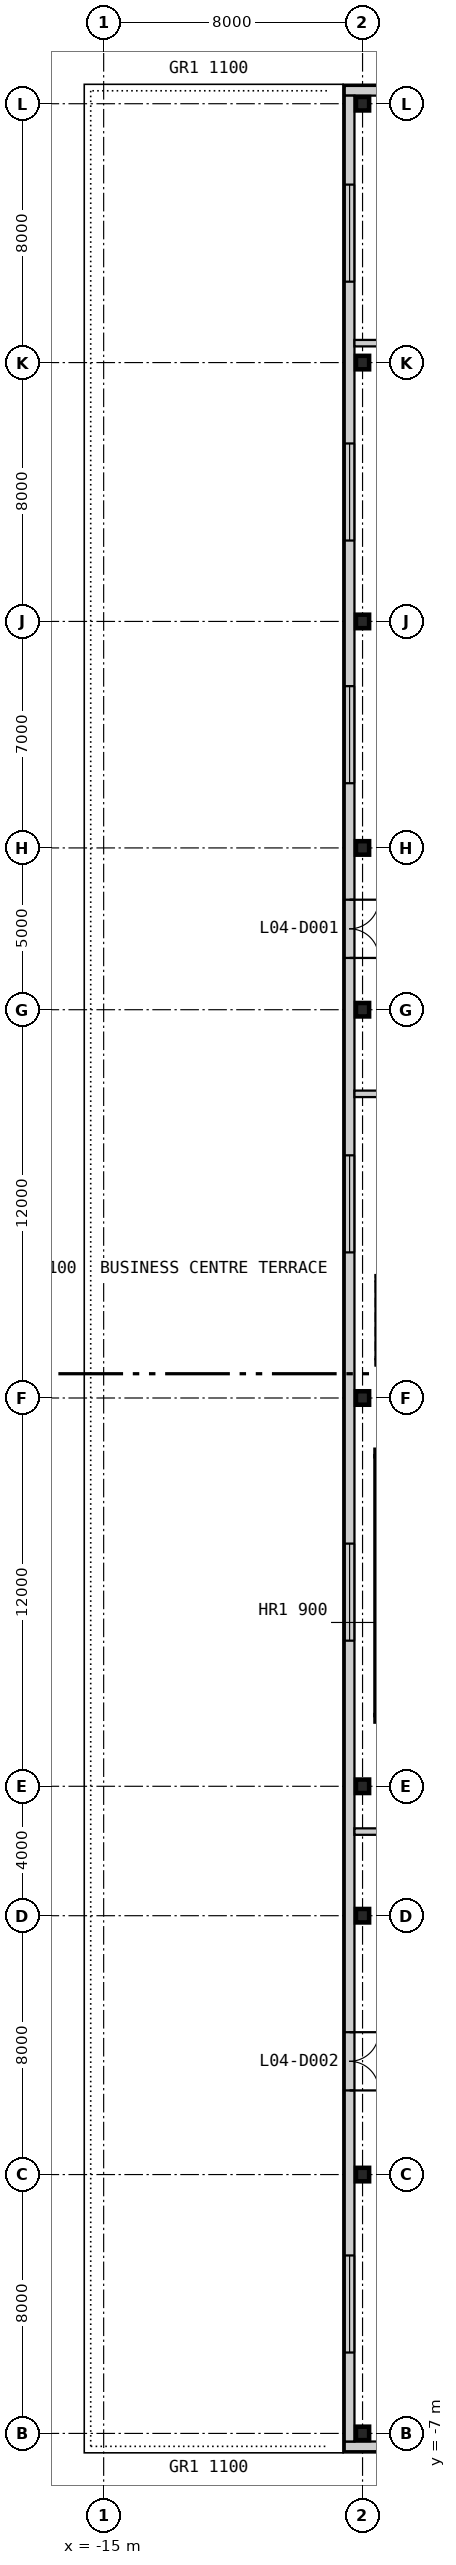
"""IFC4 building model, lengths in metres.
Left out: names, types, materials, properties, quantities, classifications, styles, units other than length and angle.
Written with IfcOpenShell. Run it as: python <this file> out.ifc"""

import sys

from ifc_helpers import new_model, si_unit, direction, frame, frame_2d, origin, origin_2d, place, context, subcontext, project, spatial, rectangle, i_section, extrude, element, fill, save


model = new_model("IFC4")
c1 = context("Model", 3, precision=1e-05, world=origin(), true_north=direction((0.0, 1.0)))
c2 = subcontext(c1, "Body", "Model", "MODEL_VIEW")
j1 = project(units=[si_unit("LENGTHUNIT", "METRE"), si_unit("PLANEANGLEUNIT", "RADIAN")], contexts=[c1])
p1 = place(None, origin())
s1 = spatial("IfcSite", under=j1, at=p1, CompositionType="ELEMENT")
p2 = place(p1, origin())
s2 = spatial("IfcBuilding", under=s1, at=p2, CompositionType="ELEMENT")
p3 = place(p2, frame((0.0, 0.0, 21.4)))
s3 = spatial("IfcBuildingStorey", under=s2, at=p3, CompositionType="ELEMENT", Elevation=21.4)
for number, where, z_axis, x_axis in (
    (1, (-7.0, -7.0, 0.0), (0.0, 0.0, 1.0), (1.0, 0.0, 0.0)),
    (2, (-7.0, 1.0, 0.0), (0.0, 0.0, 1.0), (1.0, 0.0, 0.0)),
    (3, (-7.0, 9.0, 0.0), (0.0, 0.0, 1.0), (1.0, 0.0, 0.0)),
    (4, (-7.0, 13.0, 0.0), (0.0, 0.0, 1.0), (1.0, 0.0, 0.0)),
    (5, (-7.0, 25.0, 0.0), (0.0, 0.0, 1.0), (1.0, 0.0, 0.0)),
    (6, (-7.0, 37.0, 0.0), (0.0, 0.0, 1.0), (1.0, 0.0, 0.0)),
    (7, (-7.0, 42.0, 0.0), (0.0, 0.0, 1.0), (1.0, 0.0, 0.0)),
    (8, (-7.0, 49.0, 0.0), (0.0, 0.0, 1.0), (1.0, 0.0, 0.0)),
    (9, (-7.0, 57.0, 0.0), (0.0, 0.0, 1.0), (1.0, 0.0, 0.0)),
    (10, (-7.0, 65.0, 0.0), (0.0, 0.0, 1.0), (1.0, 0.0, 0.0)),
):
    element("IfcColumn", number, at=place(p3, frame(where, z_axis=z_axis, x_axis=x_axis)), inside=s3, PredefinedType="COLUMN", context=c2, shape_type="SweptSolid", body=[
        extrude(i_section(OverallWidth=0.406, OverallDepth=0.417, WebThickness=0.03, FlangeThickness=0.048, at=origin_2d()), origin(), (0.0, 0.0, 1.0), 4.8),
    ])
p4 = place(p3, frame((-7.55, -7.4, 0.0), z_axis=(0.0, 0.0, 1.0), x_axis=(1.0, 0.0, 0.0)))
e11 = element("IfcWall", 11, at=p4, inside=s3, PredefinedType="SOLIDWALL", context=c2, shape_type="SweptSolid", body=[
    extrude(rectangle(XDim=65.1, YDim=0.3, at=frame_2d((32.55, 0.0))), origin(), (0.0, 0.0, 1.0), 4.5),
])
p5 = place(p4, frame((3.05, 0.0, 0.9)))
e12 = element("IfcOpeningElement", 12, at=p5, cuts=e11, PredefinedType="OPENING", context=c2, shape_type="SweptSolid", body=[
    extrude(rectangle(XDim=3.0, YDim=2.4, at=frame_2d((1.5, 1.2))), frame((0.0, 0.16, 0.0), z_axis=(0.0, -1.0, 0.0), x_axis=(1.0, 0.0, 0.0)), (0.0, 0.0, 1.0), 0.32),
])
p6 = place(p4, frame((11.05, 0.0, 0.9)))
e13 = element("IfcOpeningElement", 13, at=p6, cuts=e11, PredefinedType="OPENING", context=c2, shape_type="SweptSolid", body=[
    extrude(rectangle(XDim=3.0, YDim=2.4, at=frame_2d((1.5, 1.2))), frame((0.0, 0.16, 0.0), z_axis=(0.0, -1.0, 0.0), x_axis=(1.0, 0.0, 0.0)), (0.0, 0.0, 1.0), 0.32),
])
p7 = place(p4, frame((25.05, 0.0, 0.9)))
e14 = element("IfcOpeningElement", 14, at=p7, cuts=e11, PredefinedType="OPENING", context=c2, shape_type="SweptSolid", body=[
    extrude(rectangle(XDim=3.0, YDim=2.4, at=frame_2d((1.5, 1.2))), frame((0.0, 0.16, 0.0), z_axis=(0.0, -1.0, 0.0), x_axis=(1.0, 0.0, 0.0)), (0.0, 0.0, 1.0), 0.32),
])
p8 = place(p4, frame((37.05, 0.0, 0.9)))
e15 = element("IfcOpeningElement", 15, at=p8, cuts=e11, PredefinedType="OPENING", context=c2, shape_type="SweptSolid", body=[
    extrude(rectangle(XDim=3.0, YDim=2.4, at=frame_2d((1.5, 1.2))), frame((0.0, 0.16, 0.0), z_axis=(0.0, -1.0, 0.0), x_axis=(1.0, 0.0, 0.0)), (0.0, 0.0, 1.0), 0.32),
])
p9 = place(p4, frame((45.55, 0.0, 0.9)))
e16 = element("IfcOpeningElement", 16, at=p9, cuts=e11, PredefinedType="OPENING", context=c2, shape_type="SweptSolid", body=[
    extrude(rectangle(XDim=3.0, YDim=2.4, at=frame_2d((1.5, 1.2))), frame((0.0, 0.16, 0.0), z_axis=(0.0, -1.0, 0.0), x_axis=(1.0, 0.0, 0.0)), (0.0, 0.0, 1.0), 0.32),
])
p10 = place(p4, frame((51.55, 0.0, 0.9)))
e17 = element("IfcOpeningElement", 17, at=p10, cuts=e11, PredefinedType="OPENING", context=c2, shape_type="SweptSolid", body=[
    extrude(rectangle(XDim=3.0, YDim=2.4, at=frame_2d((1.5, 1.2))), frame((0.0, 0.16, 0.0), z_axis=(0.0, -1.0, 0.0), x_axis=(1.0, 0.0, 0.0)), (0.0, 0.0, 1.0), 0.32),
])
p11 = place(p4, frame((59.05, 0.0, 0.9)))
e18 = element("IfcOpeningElement", 18, at=p11, cuts=e11, PredefinedType="OPENING", context=c2, shape_type="SweptSolid", body=[
    extrude(rectangle(XDim=3.0, YDim=2.4, at=frame_2d((1.5, 1.2))), frame((0.0, 0.16, 0.0), z_axis=(0.0, -1.0, 0.0), x_axis=(1.0, 0.0, 0.0)), (0.0, 0.0, 1.0), 0.32),
])
p12 = place(p3, frame((57.55, 65.4, 0.0), z_axis=(0.0, 0.0, 1.0), x_axis=(-1.0, 0.0, 0.0)))
e19 = element("IfcWall", 19, at=p12, inside=s3, PredefinedType="SOLIDWALL", context=c2, shape_type="SweptSolid", body=[
    extrude(rectangle(XDim=65.1, YDim=0.3, at=frame_2d((32.55, 0.0))), origin(), (0.0, 0.0, 1.0), 4.5),
])
p13 = place(p12, frame((59.05, 0.0, 0.9)))
e20 = element("IfcOpeningElement", 20, at=p13, cuts=e19, PredefinedType="OPENING", context=c2, shape_type="SweptSolid", body=[
    extrude(rectangle(XDim=3.0, YDim=2.4, at=frame_2d((1.5, 1.2))), frame((0.0, 0.16, 0.0), z_axis=(0.0, -1.0, 0.0), x_axis=(1.0, 0.0, 0.0)), (0.0, 0.0, 1.0), 0.32),
])
p14 = place(p12, frame((51.05, 0.0, 0.9)))
e21 = element("IfcOpeningElement", 21, at=p14, cuts=e19, PredefinedType="OPENING", context=c2, shape_type="SweptSolid", body=[
    extrude(rectangle(XDim=3.0, YDim=2.4, at=frame_2d((1.5, 1.2))), frame((0.0, 0.16, 0.0), z_axis=(0.0, -1.0, 0.0), x_axis=(1.0, 0.0, 0.0)), (0.0, 0.0, 1.0), 0.32),
])
p15 = place(p12, frame((37.05, 0.0, 0.9)))
e22 = element("IfcOpeningElement", 22, at=p15, cuts=e19, PredefinedType="OPENING", context=c2, shape_type="SweptSolid", body=[
    extrude(rectangle(XDim=3.0, YDim=2.4, at=frame_2d((1.5, 1.2))), frame((0.0, 0.16, 0.0), z_axis=(0.0, -1.0, 0.0), x_axis=(1.0, 0.0, 0.0)), (0.0, 0.0, 1.0), 0.32),
])
p16 = place(p12, frame((25.05, 0.0, 0.9)))
e23 = element("IfcOpeningElement", 23, at=p16, cuts=e19, PredefinedType="OPENING", context=c2, shape_type="SweptSolid", body=[
    extrude(rectangle(XDim=3.0, YDim=2.4, at=frame_2d((1.5, 1.2))), frame((0.0, 0.16, 0.0), z_axis=(0.0, -1.0, 0.0), x_axis=(1.0, 0.0, 0.0)), (0.0, 0.0, 1.0), 0.32),
])
p17 = place(p12, frame((16.55, 0.0, 0.9)))
e24 = element("IfcOpeningElement", 24, at=p17, cuts=e19, PredefinedType="OPENING", context=c2, shape_type="SweptSolid", body=[
    extrude(rectangle(XDim=3.0, YDim=2.4, at=frame_2d((1.5, 1.2))), frame((0.0, 0.16, 0.0), z_axis=(0.0, -1.0, 0.0), x_axis=(1.0, 0.0, 0.0)), (0.0, 0.0, 1.0), 0.32),
])
p18 = place(p12, frame((10.55, 0.0, 0.9)))
e25 = element("IfcOpeningElement", 25, at=p18, cuts=e19, PredefinedType="OPENING", context=c2, shape_type="SweptSolid", body=[
    extrude(rectangle(XDim=3.0, YDim=2.4, at=frame_2d((1.5, 1.2))), frame((0.0, 0.16, 0.0), z_axis=(0.0, -1.0, 0.0), x_axis=(1.0, 0.0, 0.0)), (0.0, 0.0, 1.0), 0.32),
])
p19 = place(p12, frame((3.05, 0.0, 0.9)))
e26 = element("IfcOpeningElement", 26, at=p19, cuts=e19, PredefinedType="OPENING", context=c2, shape_type="SweptSolid", body=[
    extrude(rectangle(XDim=3.0, YDim=2.4, at=frame_2d((1.5, 1.2))), frame((0.0, 0.16, 0.0), z_axis=(0.0, -1.0, 0.0), x_axis=(1.0, 0.0, 0.0)), (0.0, 0.0, 1.0), 0.32),
])
p20 = place(p3, frame((-7.4, 65.25, 0.0), z_axis=(0.0, 0.0, 1.0), x_axis=(0.0, -1.0, 0.0)))
e27 = element("IfcWall", 27, at=p20, inside=s3, PredefinedType="SOLIDWALL", context=c2, shape_type="SweptSolid", body=[
    extrude(rectangle(XDim=72.5, YDim=0.3, at=frame_2d((36.25, 0.0))), origin(), (0.0, 0.0, 1.0), 4.5),
])
p21 = place(p20, frame((24.85, 0.0, 0.0)))
e28 = element("IfcOpeningElement", 28, at=p21, cuts=e27, PredefinedType="OPENING", context=c2, shape_type="SweptSolid", body=[
    extrude(rectangle(XDim=1.8, YDim=2.4, at=frame_2d((0.9, 1.2))), frame((0.0, 0.16, 0.0), z_axis=(0.0, -1.0, 0.0), x_axis=(1.0, 0.0, 0.0)), (0.0, 0.0, 1.0), 0.32),
])
p22 = place(p20, frame((59.85, 0.0, 0.0)))
e29 = element("IfcOpeningElement", 29, at=p22, cuts=e27, PredefinedType="OPENING", context=c2, shape_type="SweptSolid", body=[
    extrude(rectangle(XDim=1.8, YDim=2.4, at=frame_2d((0.9, 1.2))), frame((0.0, 0.16, 0.0), z_axis=(0.0, -1.0, 0.0), x_axis=(1.0, 0.0, 0.0)), (0.0, 0.0, 1.0), 0.32),
])
p23 = place(p20, frame((66.75, 0.0, 0.9)))
e30 = element("IfcOpeningElement", 30, at=p23, cuts=e27, PredefinedType="OPENING", context=c2, shape_type="SweptSolid", body=[
    extrude(rectangle(XDim=3.0, YDim=2.4, at=frame_2d((1.5, 1.2))), frame((0.0, 0.16, 0.0), z_axis=(0.0, -1.0, 0.0), x_axis=(1.0, 0.0, 0.0)), (0.0, 0.0, 1.0), 0.32),
])
p24 = place(p20, frame((44.75, 0.0, 0.9)))
e31 = element("IfcOpeningElement", 31, at=p24, cuts=e27, PredefinedType="OPENING", context=c2, shape_type="SweptSolid", body=[
    extrude(rectangle(XDim=3.0, YDim=2.4, at=frame_2d((1.5, 1.2))), frame((0.0, 0.16, 0.0), z_axis=(0.0, -1.0, 0.0), x_axis=(1.0, 0.0, 0.0)), (0.0, 0.0, 1.0), 0.32),
])
p25 = place(p20, frame((32.75, 0.0, 0.9)))
e32 = element("IfcOpeningElement", 32, at=p25, cuts=e27, PredefinedType="OPENING", context=c2, shape_type="SweptSolid", body=[
    extrude(rectangle(XDim=3.0, YDim=2.4, at=frame_2d((1.5, 1.2))), frame((0.0, 0.16, 0.0), z_axis=(0.0, -1.0, 0.0), x_axis=(1.0, 0.0, 0.0)), (0.0, 0.0, 1.0), 0.32),
])
p26 = place(p20, frame((18.25, 0.0, 0.9)))
e33 = element("IfcOpeningElement", 33, at=p26, cuts=e27, PredefinedType="OPENING", context=c2, shape_type="SweptSolid", body=[
    extrude(rectangle(XDim=3.0, YDim=2.4, at=frame_2d((1.5, 1.2))), frame((0.0, 0.16, 0.0), z_axis=(0.0, -1.0, 0.0), x_axis=(1.0, 0.0, 0.0)), (0.0, 0.0, 1.0), 0.32),
])
p27 = place(p20, frame((10.75, 0.0, 0.9)))
e34 = element("IfcOpeningElement", 34, at=p27, cuts=e27, PredefinedType="OPENING", context=c2, shape_type="SweptSolid", body=[
    extrude(rectangle(XDim=3.0, YDim=2.4, at=frame_2d((1.5, 1.2))), frame((0.0, 0.16, 0.0), z_axis=(0.0, -1.0, 0.0), x_axis=(1.0, 0.0, 0.0)), (0.0, 0.0, 1.0), 0.32),
])
p28 = place(p20, frame((2.75, 0.0, 0.9)))
e35 = element("IfcOpeningElement", 35, at=p28, cuts=e27, PredefinedType="OPENING", context=c2, shape_type="SweptSolid", body=[
    extrude(rectangle(XDim=3.0, YDim=2.4, at=frame_2d((1.5, 1.2))), frame((0.0, 0.16, 0.0), z_axis=(0.0, -1.0, 0.0), x_axis=(1.0, 0.0, 0.0)), (0.0, 0.0, 1.0), 0.32),
])
p29 = place(p3, frame((-6.6, 26.1, 0.0), z_axis=(0.0, 0.0, 1.0), x_axis=(1.0, 0.0, 0.0)))
e36 = element("IfcWall", 36, at=p29, inside=s3, PredefinedType="PARTITIONING", context=c2, shape_type="SweptSolid", body=[
    extrude(rectangle(XDim=2.8, YDim=0.2, at=frame_2d((1.4, 0.0))), origin(), (0.0, 0.0, 1.0), 4.5),
])
p30 = place(p3, frame((-7.25, 11.6, 0.0), z_axis=(0.0, 0.0, 1.0), x_axis=(1.0, 0.0, 0.0)))
e37 = element("IfcWall", 37, at=p30, inside=s3, PredefinedType="PARTITIONING", context=c2, shape_type="SweptSolid", body=[
    extrude(rectangle(XDim=14.25, YDim=0.2, at=frame_2d((7.125, 0.0))), origin(), (0.0, 0.0, 1.0), 4.5),
])
p31 = place(p30, frame((2.45, 0.0, 0.0)))
e38 = element("IfcOpeningElement", 38, at=p31, cuts=e37, PredefinedType="OPENING", context=c2, shape_type="SweptSolid", body=[
    extrude(rectangle(XDim=1.8, YDim=2.4, at=frame_2d((0.9, 1.2))), frame((0.0, 0.11, 0.0), z_axis=(0.0, -1.0, 0.0), x_axis=(1.0, 0.0, 0.0)), (0.0, 0.0, 1.0), 0.22),
])
p32 = place(p30, frame((9.975, 0.0, 0.0)))
e39 = element("IfcOpeningElement", 39, at=p32, cuts=e37, PredefinedType="OPENING", context=c2, shape_type="SweptSolid", body=[
    extrude(rectangle(XDim=0.9, YDim=2.2, at=frame_2d((0.45, 1.1))), frame((0.0, 0.11, 0.0), z_axis=(0.0, -1.0, 0.0), x_axis=(1.0, 0.0, 0.0)), (0.0, 0.0, 1.0), 0.22),
])
p33 = place(p3, frame((-7.25, 34.4, 0.0), z_axis=(0.0, 0.0, 1.0), x_axis=(1.0, 0.0, 0.0)))
e40 = element("IfcWall", 40, at=p33, inside=s3, PredefinedType="PARTITIONING", context=c2, shape_type="SweptSolid", body=[
    extrude(rectangle(XDim=14.25, YDim=0.2, at=frame_2d((7.125, 0.0))), origin(), (0.0, 0.0, 1.0), 4.5),
])
p34 = place(p33, frame((9.525, 0.0, 0.0)))
e41 = element("IfcOpeningElement", 41, at=p34, cuts=e40, PredefinedType="OPENING", context=c2, shape_type="SweptSolid", body=[
    extrude(rectangle(XDim=1.8, YDim=2.4, at=frame_2d((0.9, 1.2))), frame((0.0, 0.11, 0.0), z_axis=(0.0, -1.0, 0.0), x_axis=(1.0, 0.0, 0.0)), (0.0, 0.0, 1.0), 0.22),
])
p35 = place(p33, frame((2.45, 0.0, 0.0)))
e42 = element("IfcOpeningElement", 42, at=p35, cuts=e40, PredefinedType="OPENING", context=c2, shape_type="SweptSolid", body=[
    extrude(rectangle(XDim=1.8, YDim=2.4, at=frame_2d((0.9, 1.2))), frame((0.0, 0.11, 0.0), z_axis=(0.0, -1.0, 0.0), x_axis=(1.0, 0.0, 0.0)), (0.0, 0.0, 1.0), 0.22),
])
p36 = place(p3, frame((-7.25, 57.6, 0.0), z_axis=(0.0, 0.0, 1.0), x_axis=(1.0, 0.0, 0.0)))
e43 = element("IfcWall", 43, at=p36, inside=s3, PredefinedType="PARTITIONING", context=c2, shape_type="SweptSolid", body=[
    extrude(rectangle(XDim=18.85, YDim=0.2, at=frame_2d((9.425, 0.0))), origin(), (0.0, 0.0, 1.0), 4.5),
])
p37 = place(p21, origin())
e44 = element("IfcDoor", 44, at=p37, inside=s3, OperationType="DOUBLE_DOOR_SINGLE_SWING", PredefinedType="DOOR", context=c2, shape_type="SweptSolid", body=[
    extrude(rectangle(XDim=1.8, YDim=2.4, at=frame_2d((0.9, 1.2))), frame((0.0, 0.025, 0.0), z_axis=(0.0, -1.0, 0.0), x_axis=(1.0, 0.0, 0.0)), (0.0, 0.0, 1.0), 0.05),
])
fill(e28, e44)
p38 = place(p22, origin())
e45 = element("IfcDoor", 45, at=p38, inside=s3, OperationType="DOUBLE_DOOR_SINGLE_SWING", PredefinedType="DOOR", context=c2, shape_type="SweptSolid", body=[
    extrude(rectangle(XDim=1.8, YDim=2.4, at=frame_2d((0.9, 1.2))), frame((0.0, 0.025, 0.0), z_axis=(0.0, -1.0, 0.0), x_axis=(1.0, 0.0, 0.0)), (0.0, 0.0, 1.0), 0.05),
])
fill(e29, e45)
p39 = place(p23, origin())
e46 = element("IfcWindow", 46, at=p39, inside=s3, PartitioningType="SINGLE_PANEL", PredefinedType="WINDOW", context=c2, shape_type="SweptSolid", body=[
    extrude(rectangle(XDim=3.0, YDim=2.4, at=frame_2d((1.5, 1.2))), frame((0.0, 0.03, 0.0), z_axis=(0.0, -1.0, 0.0), x_axis=(1.0, 0.0, 0.0)), (0.0, 0.0, 1.0), 0.06),
])
fill(e30, e46)
p40 = place(p24, origin())
e47 = element("IfcWindow", 47, at=p40, inside=s3, PartitioningType="SINGLE_PANEL", PredefinedType="WINDOW", context=c2, shape_type="SweptSolid", body=[
    extrude(rectangle(XDim=3.0, YDim=2.4, at=frame_2d((1.5, 1.2))), frame((0.0, 0.03, 0.0), z_axis=(0.0, -1.0, 0.0), x_axis=(1.0, 0.0, 0.0)), (0.0, 0.0, 1.0), 0.06),
])
fill(e31, e47)
p41 = place(p25, origin())
e48 = element("IfcWindow", 48, at=p41, inside=s3, PartitioningType="SINGLE_PANEL", PredefinedType="WINDOW", context=c2, shape_type="SweptSolid", body=[
    extrude(rectangle(XDim=3.0, YDim=2.4, at=frame_2d((1.5, 1.2))), frame((0.0, 0.03, 0.0), z_axis=(0.0, -1.0, 0.0), x_axis=(1.0, 0.0, 0.0)), (0.0, 0.0, 1.0), 0.06),
])
fill(e32, e48)
p42 = place(p26, origin())
e49 = element("IfcWindow", 49, at=p42, inside=s3, PartitioningType="SINGLE_PANEL", PredefinedType="WINDOW", context=c2, shape_type="SweptSolid", body=[
    extrude(rectangle(XDim=3.0, YDim=2.4, at=frame_2d((1.5, 1.2))), frame((0.0, 0.03, 0.0), z_axis=(0.0, -1.0, 0.0), x_axis=(1.0, 0.0, 0.0)), (0.0, 0.0, 1.0), 0.06),
])
fill(e33, e49)
p43 = place(p27, origin())
e50 = element("IfcWindow", 50, at=p43, inside=s3, PartitioningType="SINGLE_PANEL", PredefinedType="WINDOW", context=c2, shape_type="SweptSolid", body=[
    extrude(rectangle(XDim=3.0, YDim=2.4, at=frame_2d((1.5, 1.2))), frame((0.0, 0.03, 0.0), z_axis=(0.0, -1.0, 0.0), x_axis=(1.0, 0.0, 0.0)), (0.0, 0.0, 1.0), 0.06),
])
fill(e34, e50)
p44 = place(p28, origin())
e51 = element("IfcWindow", 51, at=p44, inside=s3, PartitioningType="SINGLE_PANEL", PredefinedType="WINDOW", context=c2, shape_type="SweptSolid", body=[
    extrude(rectangle(XDim=3.0, YDim=2.4, at=frame_2d((1.5, 1.2))), frame((0.0, 0.03, 0.0), z_axis=(0.0, -1.0, 0.0), x_axis=(1.0, 0.0, 0.0)), (0.0, 0.0, 1.0), 0.06),
])
fill(e35, e51)
save(model, sys.argv[1])
